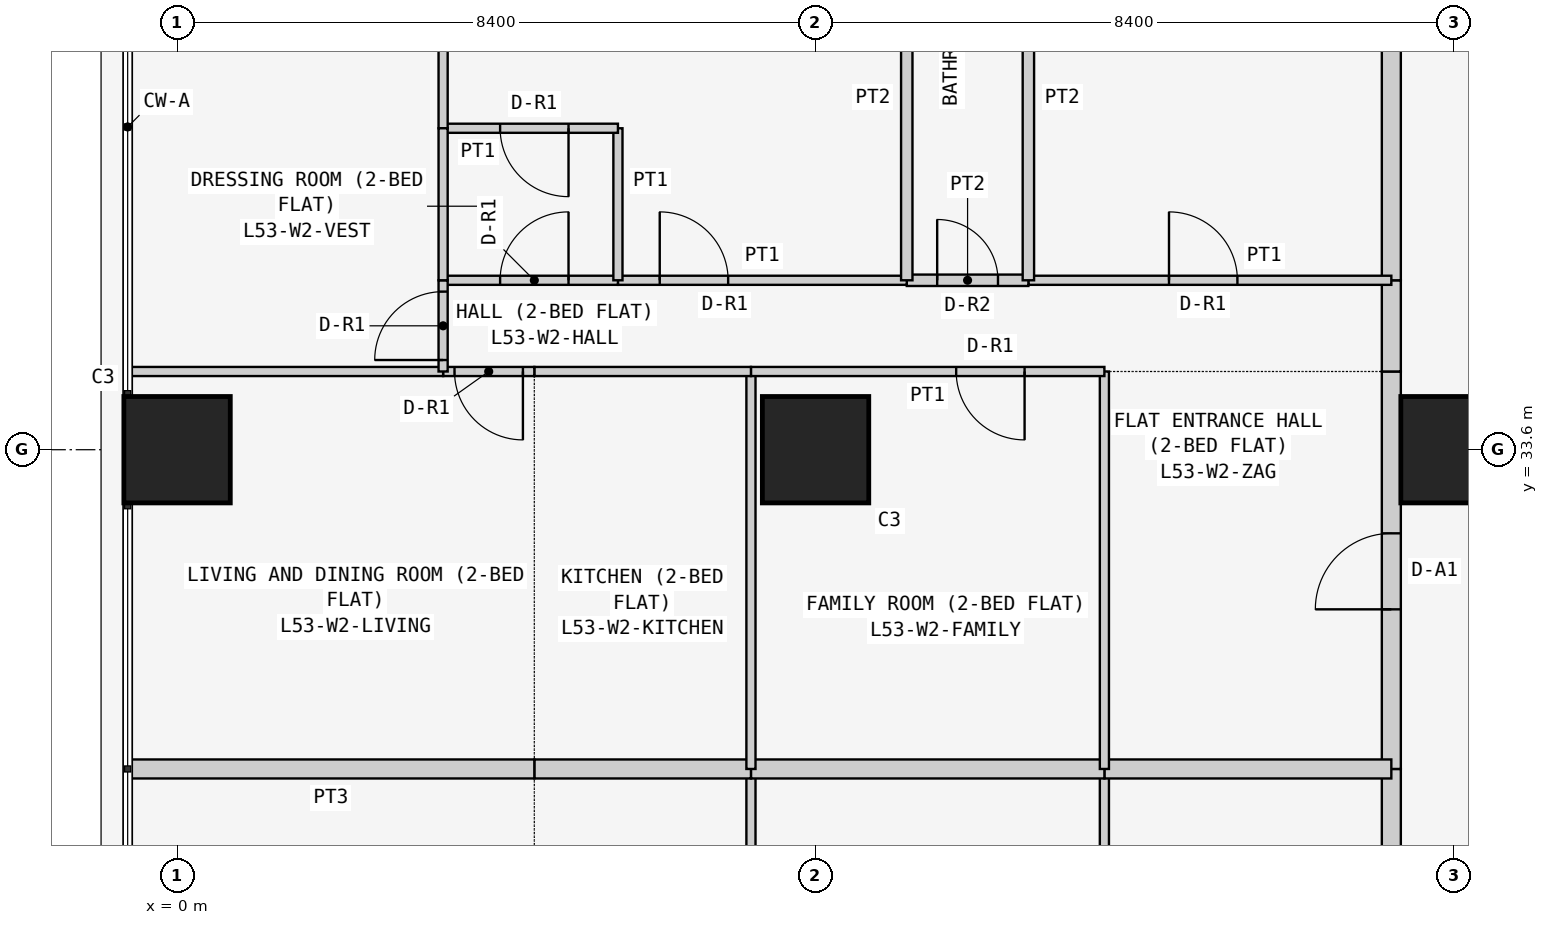
"""IFC4 building model, lengths in metres.
Left out: names, types, materials, properties, quantities, classifications, styles, units other than length and angle.
Written with IfcOpenShell. Run it as: python <this file> out.ifc"""

import sys

from ifc_helpers import new_model, si_unit, direction, frame, frame_2d, origin, origin_2d, place, context, subcontext, project, spatial, rectangle, extrude, element, fill, save


model = new_model("IFC4")
c1 = context("Model", 3, precision=1e-05, world=origin(), true_north=direction((0.0, 1.0)))
c2 = subcontext(c1, "Body", "Model", "MODEL_VIEW")
j1 = project(units=[si_unit("LENGTHUNIT", "METRE"), si_unit("PLANEANGLEUNIT", "RADIAN")], contexts=[c1])
p1 = place(None, origin())
s1 = spatial("IfcSite", under=j1, at=p1, CompositionType="ELEMENT")
p2 = place(p1, origin())
s2 = spatial("IfcBuilding", under=s1, at=p2, CompositionType="ELEMENT")
p3 = place(p2, frame((0.0, 0.0, 204.9)))
s3 = spatial("IfcBuildingStorey", under=s2, at=p3, CompositionType="ELEMENT", Elevation=204.9)
for number, where, z_axis, x_axis in (
    (1, (0.0, 33.6, 0.0), (0.0, 0.0, 1.0), (1.0, 0.0, 0.0)),
    (2, (8.4, 33.6, 0.0), (0.0, 0.0, 1.0), (1.0, 0.0, 0.0)),
    (3, (16.8, 33.6, 0.0), (0.0, 0.0, 1.0), (1.0, 0.0, 0.0)),
):
    element("IfcColumn", number, at=place(p3, frame(where, z_axis=z_axis, x_axis=x_axis)), inside=s3, PredefinedType="COLUMN", context=c2, shape_type="SweptSolid", body=[
        extrude(rectangle(XDim=1.4, YDim=1.4, at=origin_2d()), origin(), (0.0, 0.0, 1.0), 3.6),
    ])
p4 = place(p3, frame((15.975, 24.171, 0.0), z_axis=(0.0, 0.0, 1.0), x_axis=(0.0, 1.0, 0.0)))
e4 = element("IfcWall", 4, at=p4, inside=s3, PredefinedType="PARTITIONING", context=c2, shape_type="SweptSolid", body=[
    extrude(rectangle(XDim=5.229, YDim=0.25, at=frame_2d((2.615, 0.0))), origin(), (0.0, 0.0, 1.0), 3.45),
])
p5 = place(p4, frame((2.129, 0.0, 0.0)))
e5 = element("IfcOpeningElement", 5, at=p5, cuts=e4, PredefinedType="OPENING", context=c2, shape_type="SweptSolid", body=[
    extrude(rectangle(XDim=1.0, YDim=2.1, at=frame_2d((0.5, 1.05))), frame((0.0, 0.135, 0.0), z_axis=(0.0, -1.0, 0.0), x_axis=(1.0, 0.0, 0.0)), (0.0, 0.0, 1.0), 0.27),
])
p6 = place(p3, frame((15.975, 29.4, 0.0), z_axis=(0.0, 0.0, 1.0), x_axis=(0.0, 1.0, 0.0)))
e6 = element("IfcWall", 6, at=p6, inside=s3, PredefinedType="PARTITIONING", context=c2, shape_type="SweptSolid", body=[
    extrude(rectangle(XDim=5.229, YDim=0.25, at=frame_2d((2.615, 0.0))), origin(), (0.0, 0.0, 1.0), 3.45),
])
p7 = place(p6, frame((2.1, 0.0, 0.0)))
e7 = element("IfcOpeningElement", 7, at=p7, cuts=e6, PredefinedType="OPENING", context=c2, shape_type="SweptSolid", body=[
    extrude(rectangle(XDim=1.0, YDim=2.1, at=frame_2d((0.5, 1.05))), frame((0.0, 0.135, 0.0), z_axis=(0.0, -1.0, 0.0), x_axis=(1.0, 0.0, 0.0)), (0.0, 0.0, 1.0), 0.27),
])
p8 = place(p3, frame((15.975, 34.629, 0.0), z_axis=(0.0, 0.0, 1.0), x_axis=(0.0, 1.0, 0.0)))
e8 = element("IfcWall", 8, at=p8, inside=s3, PredefinedType="PARTITIONING", context=c2, shape_type="SweptSolid", body=[
    extrude(rectangle(XDim=1.2, YDim=0.25, at=frame_2d((0.6, 0.0))), origin(), (0.0, 0.0, 1.0), 3.45),
])
p9 = place(p3, frame((15.975, 35.829, 0.0), z_axis=(0.0, 0.0, 1.0), x_axis=(0.0, 1.0, 0.0)))
e9 = element("IfcWall", 9, at=p9, inside=s3, PredefinedType="PARTITIONING", context=c2, shape_type="SweptSolid", body=[
    extrude(rectangle(XDim=6.871, YDim=0.25, at=frame_2d((3.436, 0.0))), origin(), (0.0, 0.0, 1.0), 3.45),
])
p10 = place(p3, frame((12.2, 29.4, 0.0), z_axis=(0.0, 0.0, 1.0), x_axis=(0.0, -1.0, 0.0)))
e10 = element("IfcWall", 10, at=p10, inside=s3, PredefinedType="PARTITIONING", context=c2, shape_type="SweptSolid", body=[
    extrude(rectangle(XDim=5.229, YDim=0.12, at=frame_2d((2.615, 0.0))), origin(), (0.0, 0.0, 1.0), 3.45),
])
p11 = place(p3, frame((15.975, 29.4, 0.0), z_axis=(0.0, 0.0, 1.0), x_axis=(-1.0, 0.0, 0.0)))
e11 = element("IfcWall", 11, at=p11, inside=s3, PredefinedType="PARTITIONING", context=c2, shape_type="SweptSolid", body=[
    extrude(rectangle(XDim=3.775, YDim=0.25, at=frame_2d((1.888, 0.0))), origin(), (0.0, 0.0, 1.0), 3.45),
])
p12 = place(p3, frame((7.55, 29.4, 0.0), z_axis=(0.0, 0.0, 1.0), x_axis=(0.0, -1.0, 0.0)))
e12 = element("IfcWall", 12, at=p12, inside=s3, PredefinedType="PARTITIONING", context=c2, shape_type="SweptSolid", body=[
    extrude(rectangle(XDim=5.229, YDim=0.12, at=frame_2d((2.615, 0.0))), origin(), (0.0, 0.0, 1.0), 3.45),
])
p13 = place(p3, frame((12.2, 29.4, 0.0), z_axis=(0.0, 0.0, 1.0), x_axis=(-1.0, 0.0, 0.0)))
e13 = element("IfcWall", 13, at=p13, inside=s3, PredefinedType="PARTITIONING", context=c2, shape_type="SweptSolid", body=[
    extrude(rectangle(XDim=4.65, YDim=0.25, at=frame_2d((2.325, 0.0))), origin(), (0.0, 0.0, 1.0), 3.45),
])
p14 = place(p3, frame((7.55, 29.4, 0.0), z_axis=(0.0, 0.0, 1.0), x_axis=(-1.0, 0.0, 0.0)))
e14 = element("IfcWall", 14, at=p14, inside=s3, PredefinedType="PARTITIONING", context=c2, shape_type="SweptSolid", body=[
    extrude(rectangle(XDim=2.85, YDim=0.25, at=frame_2d((1.425, 0.0))), origin(), (0.0, 0.0, 1.0), 3.45),
])
p15 = place(p3, frame((4.7, 29.4, 0.0), z_axis=(0.0, 0.0, 1.0), x_axis=(-1.0, 0.0, 0.0)))
e15 = element("IfcWall", 15, at=p15, inside=s3, PredefinedType="PARTITIONING", context=c2, shape_type="SweptSolid", body=[
    extrude(rectangle(XDim=5.35, YDim=0.25, at=frame_2d((2.675, 0.0))), origin(), (0.0, 0.0, 1.0), 3.45),
])
for number, where, z_axis, x_axis in (
    (16, (12.2, 29.4, 0.0), (0.0, 0.0, 1.0), (0.0, 1.0, 0.0)),
    (17, (7.55, 29.4, 0.0), (0.0, 0.0, 1.0), (0.0, 1.0, 0.0)),
):
    element("IfcWall", number, at=place(p3, frame(where, z_axis=z_axis, x_axis=x_axis)), inside=s3, PredefinedType="PARTITIONING", context=c2, shape_type="SweptSolid", body=[
        extrude(rectangle(XDim=5.229, YDim=0.12, at=frame_2d((2.615, 0.0))), origin(), (0.0, 0.0, 1.0), 3.45),
    ])
p16 = place(p3, frame((7.55, 34.629, 0.0), z_axis=(0.0, 0.0, 1.0), x_axis=(1.0, 0.0, 0.0)))
e18 = element("IfcWall", 18, at=p16, inside=s3, PredefinedType="PARTITIONING", context=c2, shape_type="SweptSolid", body=[
    extrude(rectangle(XDim=4.65, YDim=0.12, at=frame_2d((2.325, 0.0))), origin(), (0.0, 0.0, 1.0), 3.45),
])
p17 = place(p16, frame((2.7, 0.0, 0.0)))
e19 = element("IfcOpeningElement", 19, at=p17, cuts=e18, PredefinedType="OPENING", context=c2, shape_type="SweptSolid", body=[
    extrude(rectangle(XDim=0.9, YDim=2.1, at=frame_2d((0.45, 1.05))), frame((0.0, 0.07, 0.0), z_axis=(0.0, -1.0, 0.0), x_axis=(1.0, 0.0, 0.0)), (0.0, 0.0, 1.0), 0.14),
])
p18 = place(p3, frame((4.7, 34.629, 0.0), z_axis=(0.0, 0.0, 1.0), x_axis=(1.0, 0.0, 0.0)))
e20 = element("IfcWall", 20, at=p18, inside=s3, PredefinedType="PARTITIONING", context=c2, shape_type="SweptSolid", body=[
    extrude(rectangle(XDim=2.85, YDim=0.12, at=frame_2d((1.425, 0.0))), origin(), (0.0, 0.0, 1.0), 3.45),
])
p19 = place(p3, frame((3.5, 34.629, 0.0), z_axis=(0.0, 0.0, 1.0), x_axis=(1.0, 0.0, 0.0)))
e21 = element("IfcWall", 21, at=p19, inside=s3, PredefinedType="PARTITIONING", context=c2, shape_type="SweptSolid", body=[
    extrude(rectangle(XDim=1.2, YDim=0.12, at=frame_2d((0.6, 0.0))), origin(), (0.0, 0.0, 1.0), 3.45),
])
p20 = place(p19, frame((0.15, 0.0, 0.0)))
e22 = element("IfcOpeningElement", 22, at=p20, cuts=e21, PredefinedType="OPENING", context=c2, shape_type="SweptSolid", body=[
    extrude(rectangle(XDim=0.9, YDim=2.1, at=frame_2d((0.45, 1.05))), frame((0.0, 0.07, 0.0), z_axis=(0.0, -1.0, 0.0), x_axis=(1.0, 0.0, 0.0)), (0.0, 0.0, 1.0), 0.14),
])
p21 = place(p3, frame((-0.65, 34.629, 0.0), z_axis=(0.0, 0.0, 1.0), x_axis=(1.0, 0.0, 0.0)))
e23 = element("IfcWall", 23, at=p21, inside=s3, PredefinedType="PARTITIONING", context=c2, shape_type="SweptSolid", body=[
    extrude(rectangle(XDim=4.15, YDim=0.12, at=frame_2d((2.075, 0.0))), origin(), (0.0, 0.0, 1.0), 3.45),
])
p22 = place(p3, frame((11.2, 35.829, 0.0), z_axis=(0.0, 0.0, 1.0), x_axis=(1.0, 0.0, 0.0)))
e24 = element("IfcWall", 24, at=p22, inside=s3, PredefinedType="PARTITIONING", context=c2, shape_type="SweptSolid", body=[
    extrude(rectangle(XDim=4.775, YDim=0.12, at=frame_2d((2.388, 0.0))), origin(), (0.0, 0.0, 1.0), 3.45),
])
p23 = place(p22, frame((1.85, 0.0, 0.0)))
e25 = element("IfcOpeningElement", 25, at=p23, cuts=e24, PredefinedType="OPENING", context=c2, shape_type="SweptSolid", body=[
    extrude(rectangle(XDim=0.9, YDim=2.1, at=frame_2d((0.45, 1.05))), frame((0.0, 0.07, 0.0), z_axis=(0.0, -1.0, 0.0), x_axis=(1.0, 0.0, 0.0)), (0.0, 0.0, 1.0), 0.14),
])
p24 = place(p3, frame((9.6, 35.829, 0.0), z_axis=(0.0, 0.0, 1.0), x_axis=(1.0, 0.0, 0.0)))
e26 = element("IfcWall", 26, at=p24, inside=s3, PredefinedType="PARTITIONING", context=c2, shape_type="SweptSolid", body=[
    extrude(rectangle(XDim=1.6, YDim=0.15, at=frame_2d((0.8, 0.0))), origin(), (0.0, 0.0, 1.0), 3.45),
])
p25 = place(p24, frame((0.4, 0.0, 0.0)))
e27 = element("IfcOpeningElement", 27, at=p25, cuts=e26, PredefinedType="OPENING", context=c2, shape_type="SweptSolid", body=[
    extrude(rectangle(XDim=0.8, YDim=2.1, at=frame_2d((0.4, 1.05))), frame((0.0, 0.085, 0.0), z_axis=(0.0, -1.0, 0.0), x_axis=(1.0, 0.0, 0.0)), (0.0, 0.0, 1.0), 0.17),
])
p26 = place(p3, frame((5.8, 35.829, 0.0), z_axis=(0.0, 0.0, 1.0), x_axis=(1.0, 0.0, 0.0)))
e28 = element("IfcWall", 28, at=p26, inside=s3, PredefinedType="PARTITIONING", context=c2, shape_type="SweptSolid", body=[
    extrude(rectangle(XDim=3.8, YDim=0.12, at=frame_2d((1.9, 0.0))), origin(), (0.0, 0.0, 1.0), 3.45),
])
p27 = place(p26, frame((0.55, 0.0, 0.0)))
e29 = element("IfcOpeningElement", 29, at=p27, cuts=e28, PredefinedType="OPENING", context=c2, shape_type="SweptSolid", body=[
    extrude(rectangle(XDim=0.9, YDim=2.1, at=frame_2d((0.45, 1.05))), frame((0.0, 0.07, 0.0), z_axis=(0.0, -1.0, 0.0), x_axis=(1.0, 0.0, 0.0)), (0.0, 0.0, 1.0), 0.14),
])
p28 = place(p3, frame((3.5, 35.829, 0.0), z_axis=(0.0, 0.0, 1.0), x_axis=(1.0, 0.0, 0.0)))
e30 = element("IfcWall", 30, at=p28, inside=s3, PredefinedType="PARTITIONING", context=c2, shape_type="SweptSolid", body=[
    extrude(rectangle(XDim=2.3, YDim=0.12, at=frame_2d((1.15, 0.0))), origin(), (0.0, 0.0, 1.0), 3.45),
])
p29 = place(p28, frame((0.75, 0.0, 0.0)))
e31 = element("IfcOpeningElement", 31, at=p29, cuts=e30, PredefinedType="OPENING", context=c2, shape_type="SweptSolid", body=[
    extrude(rectangle(XDim=0.9, YDim=2.1, at=frame_2d((0.45, 1.05))), frame((0.0, 0.07, 0.0), z_axis=(0.0, -1.0, 0.0), x_axis=(1.0, 0.0, 0.0)), (0.0, 0.0, 1.0), 0.14),
])
p30 = place(p3, frame((3.5, 34.629, 0.0), z_axis=(0.0, 0.0, 1.0), x_axis=(0.0, 1.0, 0.0)))
e32 = element("IfcWall", 32, at=p30, inside=s3, PredefinedType="PARTITIONING", context=c2, shape_type="SweptSolid", body=[
    extrude(rectangle(XDim=1.2, YDim=0.12, at=frame_2d((0.6, 0.0))), origin(), (0.0, 0.0, 1.0), 3.45),
])
p31 = place(p30, frame((0.151, 0.0, 0.0)))
e33 = element("IfcOpeningElement", 33, at=p31, cuts=e32, PredefinedType="OPENING", context=c2, shape_type="SweptSolid", body=[
    extrude(rectangle(XDim=0.9, YDim=2.1, at=frame_2d((0.45, 1.05))), frame((0.0, 0.07, 0.0), z_axis=(0.0, -1.0, 0.0), x_axis=(1.0, 0.0, 0.0)), (0.0, 0.0, 1.0), 0.14),
])
for number, where, z_axis, x_axis in (
    (34, (11.2, 35.829, 0.0), (0.0, 0.0, 1.0), (0.0, 1.0, 0.0)),
    (35, (9.6, 35.829, 0.0), (0.0, 0.0, 1.0), (0.0, 1.0, 0.0)),
):
    element("IfcWall", number, at=place(p3, frame(where, z_axis=z_axis, x_axis=x_axis)), inside=s3, PredefinedType="PARTITIONING", context=c2, shape_type="SweptSolid", body=[
        extrude(rectangle(XDim=6.871, YDim=0.15, at=frame_2d((3.436, 0.0))), origin(), (0.0, 0.0, 1.0), 3.45),
    ])
p32 = place(p3, frame((5.8, 35.829, 0.0), z_axis=(0.0, 0.0, 1.0), x_axis=(0.0, 1.0, 0.0)))
e36 = element("IfcWall", 36, at=p32, inside=s3, PredefinedType="PARTITIONING", context=c2, shape_type="SweptSolid", body=[
    extrude(rectangle(XDim=2.0, YDim=0.12, at=frame_2d((1.0, 0.0))), origin(), (0.0, 0.0, 1.0), 3.45),
])
p33 = place(p3, frame((5.8, 37.829, 0.0), z_axis=(0.0, 0.0, 1.0), x_axis=(-1.0, 0.0, 0.0)))
e37 = element("IfcWall", 37, at=p33, inside=s3, PredefinedType="PARTITIONING", context=c2, shape_type="SweptSolid", body=[
    extrude(rectangle(XDim=2.3, YDim=0.12, at=frame_2d((1.15, 0.0))), origin(), (0.0, 0.0, 1.0), 3.45),
])
p34 = place(p33, frame((0.65, 0.0, 0.0)))
e38 = element("IfcOpeningElement", 38, at=p34, cuts=e37, PredefinedType="OPENING", context=c2, shape_type="SweptSolid", body=[
    extrude(rectangle(XDim=0.9, YDim=2.1, at=frame_2d((0.45, 1.05))), frame((0.0, 0.07, 0.0), z_axis=(0.0, -1.0, 0.0), x_axis=(1.0, 0.0, 0.0)), (0.0, 0.0, 1.0), 0.14),
])
p35 = place(p3, frame((3.5, 37.829, 0.0), z_axis=(0.0, 0.0, 1.0), x_axis=(0.0, 1.0, 0.0)))
e39 = element("IfcWall", 39, at=p35, inside=s3, PredefinedType="PARTITIONING", context=c2, shape_type="SweptSolid", body=[
    extrude(rectangle(XDim=4.871, YDim=0.12, at=frame_2d((2.436, 0.0))), origin(), (0.0, 0.0, 1.0), 3.45),
])
p36 = place(p3, frame((3.5, 35.829, 0.0), z_axis=(0.0, 0.0, 1.0), x_axis=(0.0, 1.0, 0.0)))
e40 = element("IfcWall", 40, at=p36, inside=s3, PredefinedType="PARTITIONING", context=c2, shape_type="SweptSolid", body=[
    extrude(rectangle(XDim=2.0, YDim=0.12, at=frame_2d((1.0, 0.0))), origin(), (0.0, 0.0, 1.0), 3.45),
])
p37 = place(p7, origin())
e41 = element("IfcDoor", 41, at=p37, inside=s3, OperationType="SINGLE_SWING_LEFT", PredefinedType="DOOR", context=c2, shape_type="SweptSolid", body=[
    extrude(rectangle(XDim=1.0, YDim=2.1, at=frame_2d((0.5, 1.05))), frame((0.0, 0.025, 0.0), z_axis=(0.0, -1.0, 0.0), x_axis=(1.0, 0.0, 0.0)), (0.0, 0.0, 1.0), 0.05),
])
fill(e7, e41)
p38 = place(p17, frame((0.9, 0.0, 0.0), z_axis=(0.0, 0.0, 1.0), x_axis=(-1.0, 0.0, 0.0)))
e42 = element("IfcDoor", 42, at=p38, inside=s3, OperationType="SINGLE_SWING_LEFT", PredefinedType="DOOR", context=c2, shape_type="SweptSolid", body=[
    extrude(rectangle(XDim=0.9, YDim=2.1, at=frame_2d((0.45, 1.05))), frame((0.0, 0.025, 0.0), z_axis=(0.0, -1.0, 0.0), x_axis=(1.0, 0.0, 0.0)), (0.0, 0.0, 1.0), 0.05),
])
fill(e19, e42)
p39 = place(p20, frame((0.9, 0.0, 0.0), z_axis=(0.0, 0.0, 1.0), x_axis=(-1.0, 0.0, 0.0)))
e43 = element("IfcDoor", 43, at=p39, inside=s3, OperationType="SINGLE_SWING_LEFT", PredefinedType="DOOR", context=c2, shape_type="SweptSolid", body=[
    extrude(rectangle(XDim=0.9, YDim=2.1, at=frame_2d((0.45, 1.05))), frame((0.0, 0.025, 0.0), z_axis=(0.0, -1.0, 0.0), x_axis=(1.0, 0.0, 0.0)), (0.0, 0.0, 1.0), 0.05),
])
fill(e22, e43)
p40 = place(p23, origin())
e44 = element("IfcDoor", 44, at=p40, inside=s3, OperationType="SINGLE_SWING_LEFT", PredefinedType="DOOR", context=c2, shape_type="SweptSolid", body=[
    extrude(rectangle(XDim=0.9, YDim=2.1, at=frame_2d((0.45, 1.05))), frame((0.0, 0.025, 0.0), z_axis=(0.0, -1.0, 0.0), x_axis=(1.0, 0.0, 0.0)), (0.0, 0.0, 1.0), 0.05),
])
fill(e25, e44)
p41 = place(p25, origin())
e45 = element("IfcDoor", 45, at=p41, inside=s3, OperationType="SINGLE_SWING_LEFT", PredefinedType="DOOR", context=c2, shape_type="SweptSolid", body=[
    extrude(rectangle(XDim=0.8, YDim=2.1, at=frame_2d((0.4, 1.05))), frame((0.0, 0.025, 0.0), z_axis=(0.0, -1.0, 0.0), x_axis=(1.0, 0.0, 0.0)), (0.0, 0.0, 1.0), 0.05),
])
fill(e27, e45)
p42 = place(p27, origin())
e46 = element("IfcDoor", 46, at=p42, inside=s3, OperationType="SINGLE_SWING_LEFT", PredefinedType="DOOR", context=c2, shape_type="SweptSolid", body=[
    extrude(rectangle(XDim=0.9, YDim=2.1, at=frame_2d((0.45, 1.05))), frame((0.0, 0.025, 0.0), z_axis=(0.0, -1.0, 0.0), x_axis=(1.0, 0.0, 0.0)), (0.0, 0.0, 1.0), 0.05),
])
fill(e29, e46)
p43 = place(p29, origin())
e47 = element("IfcDoor", 47, at=p43, inside=s3, OperationType="SINGLE_SWING_RIGHT", PredefinedType="DOOR", context=c2, shape_type="SweptSolid", body=[
    extrude(rectangle(XDim=0.9, YDim=2.1, at=frame_2d((0.45, 1.05))), frame((0.0, 0.025, 0.0), z_axis=(0.0, -1.0, 0.0), x_axis=(1.0, 0.0, 0.0)), (0.0, 0.0, 1.0), 0.05),
])
fill(e31, e47)
p44 = place(p34, origin())
e48 = element("IfcDoor", 48, at=p44, inside=s3, OperationType="SINGLE_SWING_LEFT", PredefinedType="DOOR", context=c2, shape_type="SweptSolid", body=[
    extrude(rectangle(XDim=0.9, YDim=2.1, at=frame_2d((0.45, 1.05))), frame((0.0, 0.025, 0.0), z_axis=(0.0, -1.0, 0.0), x_axis=(1.0, 0.0, 0.0)), (0.0, 0.0, 1.0), 0.05),
])
fill(e38, e48)
p45 = place(p31, origin())
e49 = element("IfcDoor", 49, at=p45, inside=s3, OperationType="SINGLE_SWING_LEFT", PredefinedType="DOOR", context=c2, shape_type="SweptSolid", body=[
    extrude(rectangle(XDim=0.9, YDim=2.1, at=frame_2d((0.45, 1.05))), frame((0.0, 0.025, 0.0), z_axis=(0.0, -1.0, 0.0), x_axis=(1.0, 0.0, 0.0)), (0.0, 0.0, 1.0), 0.05),
])
fill(e33, e49)
save(model, sys.argv[1])
